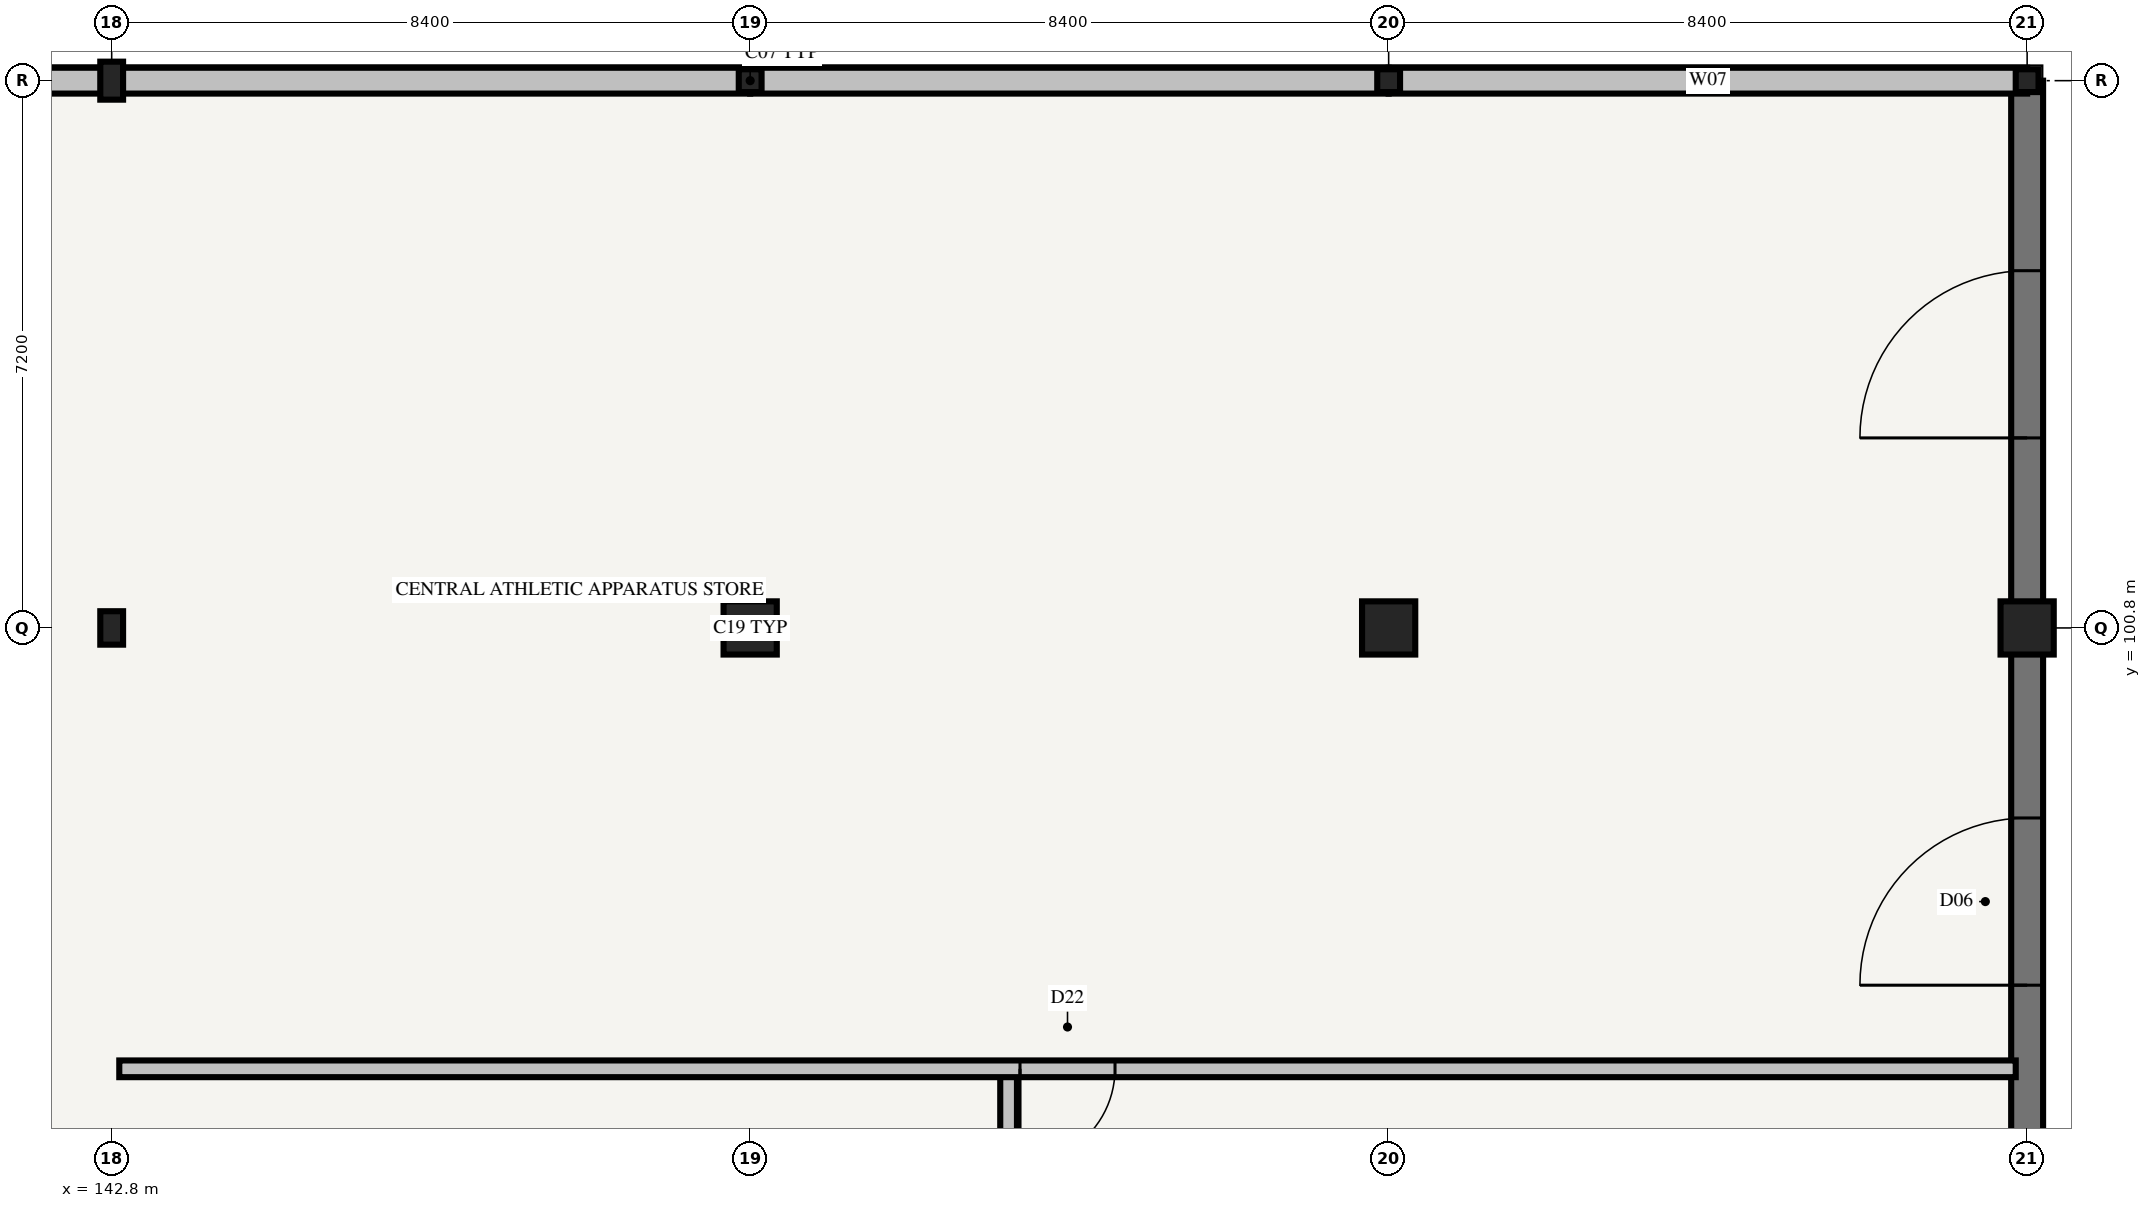
"""IFC4 building model, lengths in metres.
Left out: names, types, materials, properties, quantities, classifications, styles, units other than length and angle.
Written with IfcOpenShell. Run it as: python <this file> out.ifc"""

import sys

from ifc_helpers import new_model, si_unit, direction, frame, frame_2d, origin, origin_2d, place, context, subcontext, project, spatial, rectangle, i_section, extrude, element, fill, save


model = new_model("IFC4")
c1 = context("Model", 3, precision=1e-05, world=origin(), true_north=direction((0.0, 1.0)))
c2 = subcontext(c1, "Body", "Model", "MODEL_VIEW")
j1 = project(units=[si_unit("LENGTHUNIT", "METRE"), si_unit("PLANEANGLEUNIT", "RADIAN")], contexts=[c1])
p1 = place(None, origin())
s1 = spatial("IfcSite", under=j1, at=p1, CompositionType="ELEMENT")
p2 = place(p1, origin())
s2 = spatial("IfcBuilding", under=s1, at=p2, CompositionType="ELEMENT")
p3 = place(p2, origin())
s3 = spatial("IfcBuildingStorey", under=s2, at=p3, CompositionType="ELEMENT", Elevation=0.0)
p4 = place(p3, frame((142.8, 100.8, -0.42), z_axis=(0.0, 0.0, 1.0), x_axis=(1.0, 0.0, 0.0)))
e1 = element("IfcColumn", 1, at=p4, inside=s3, PredefinedType="COLUMN", context=c2, shape_type="SweptSolid", body=[
    extrude(i_section(OverallWidth=0.3, OverallDepth=0.44, WebThickness=0.011, FlangeThickness=0.021, FilletRadius=0.027, at=origin_2d()), origin(), (0.0, 0.0, 1.0), 4.92),
])
p5 = place(p3, frame((142.8, 108.0, -0.42), z_axis=(0.0, 0.0, 1.0), x_axis=(1.0, 0.0, 0.0)))
e2 = element("IfcColumn", 2, at=p5, inside=s3, PredefinedType="COLUMN", context=c2, shape_type="SweptSolid", body=[
    extrude(i_section(OverallWidth=0.3, OverallDepth=0.5, WebThickness=0.014, FlangeThickness=0.028, FilletRadius=0.027, at=origin_2d()), origin(), (0.0, 0.0, 1.0), 4.92),
])
p6 = place(p3, frame((151.2, 100.8, -0.42), z_axis=(0.0, 0.0, 1.0), x_axis=(1.0, 0.0, 0.0)))
e3 = element("IfcColumn", 3, at=p6, inside=s3, PredefinedType="COLUMN", context=c2, shape_type="SweptSolid", body=[
    extrude(rectangle(XDim=0.7, YDim=0.7, at=origin_2d()), origin(), (0.0, 0.0, 1.0), 4.92),
])
p7 = place(p3, frame((151.2, 108.0, -0.42), z_axis=(0.0, 0.0, 1.0), x_axis=(1.0, 0.0, 0.0)))
e4 = element("IfcColumn", 4, at=p7, inside=s3, PredefinedType="COLUMN", context=c2, shape_type="SweptSolid", body=[
    extrude(i_section(OverallWidth=0.3, OverallDepth=0.3, WebThickness=0.011, FlangeThickness=0.019, FilletRadius=0.027, at=origin_2d()), origin(), (0.0, 0.0, 1.0), 4.92),
])
p8 = place(p3, frame((159.6, 100.8, -0.42), z_axis=(0.0, 0.0, 1.0), x_axis=(1.0, 0.0, 0.0)))
e5 = element("IfcColumn", 5, at=p8, inside=s3, PredefinedType="COLUMN", context=c2, shape_type="SweptSolid", body=[
    extrude(rectangle(XDim=0.7, YDim=0.7, at=origin_2d()), origin(), (0.0, 0.0, 1.0), 4.92),
])
p9 = place(p3, frame((159.6, 108.0, -0.42), z_axis=(0.0, 0.0, 1.0), x_axis=(1.0, 0.0, 0.0)))
e6 = element("IfcColumn", 6, at=p9, inside=s3, PredefinedType="COLUMN", context=c2, shape_type="SweptSolid", body=[
    extrude(i_section(OverallWidth=0.3, OverallDepth=0.3, WebThickness=0.011, FlangeThickness=0.019, FilletRadius=0.027, at=origin_2d()), origin(), (0.0, 0.0, 1.0), 4.92),
])
p10 = place(p3, frame((168.0, 100.8, -0.42), z_axis=(0.0, 0.0, 1.0), x_axis=(1.0, 0.0, 0.0)))
e7 = element("IfcColumn", 7, at=p10, inside=s3, PredefinedType="COLUMN", context=c2, shape_type="SweptSolid", body=[
    extrude(rectangle(XDim=0.7, YDim=0.7, at=origin_2d()), origin(), (0.0, 0.0, 1.0), 4.92),
])
p11 = place(p3, frame((168.0, 108.0, -0.42), z_axis=(0.0, 0.0, 1.0), x_axis=(1.0, 0.0, 0.0)))
e8 = element("IfcColumn", 8, at=p11, inside=s3, PredefinedType="COLUMN", context=c2, shape_type="SweptSolid", body=[
    extrude(i_section(OverallWidth=0.3, OverallDepth=0.3, WebThickness=0.011, FlangeThickness=0.019, FilletRadius=0.027, at=origin_2d()), origin(), (0.0, 0.0, 1.0), 4.92),
])
p12 = place(p3, frame((168.0, 93.6, 0.0), z_axis=(0.0, 0.0, 1.0), x_axis=(0.0, 1.0, 0.0)))
e9 = element("IfcWall", 9, at=p12, inside=s3, PredefinedType="SOLIDWALL", context=c2, shape_type="SweptSolid", body=[
    extrude(rectangle(XDim=7.2, YDim=0.42, at=frame_2d((3.6, 0.0))), origin(), (0.0, 0.0, 1.0), 3.755),
])
p13 = place(p12, frame((2.5, 0.0, 0.0)))
e10 = element("IfcOpeningElement", 10, at=p13, cuts=e9, PredefinedType="OPENING", context=c2, shape_type="SweptSolid", body=[
    extrude(rectangle(XDim=2.2, YDim=2.6, at=frame_2d((1.1, 1.3))), frame((0.0, 0.235, 0.0), z_axis=(0.0, -1.0, 0.0), x_axis=(1.0, 0.0, 0.0)), (0.0, 0.0, 1.0), 0.47),
])
p14 = place(p3, frame((168.0, 100.8, 0.0), z_axis=(0.0, 0.0, 1.0), x_axis=(0.0, 1.0, 0.0)))
e11 = element("IfcWall", 11, at=p14, inside=s3, PredefinedType="SOLIDWALL", context=c2, shape_type="SweptSolid", body=[
    extrude(rectangle(XDim=7.2, YDim=0.42, at=frame_2d((3.6, 0.0))), origin(), (0.0, 0.0, 1.0), 3.755),
])
p15 = place(p14, frame((2.5, 0.0, 0.0)))
e12 = element("IfcOpeningElement", 12, at=p15, cuts=e11, PredefinedType="OPENING", context=c2, shape_type="SweptSolid", body=[
    extrude(rectangle(XDim=2.2, YDim=2.6, at=frame_2d((1.1, 1.3))), frame((0.0, 0.235, 0.0), z_axis=(0.0, -1.0, 0.0), x_axis=(1.0, 0.0, 0.0)), (0.0, 0.0, 1.0), 0.47),
])
p16 = place(p3, frame((168.0, 108.0, 0.0), z_axis=(0.0, 0.0, 1.0), x_axis=(-1.0, 0.0, 0.0)))
e13 = element("IfcWall", 13, at=p16, inside=s3, PredefinedType="STANDARD", context=c2, shape_type="SweptSolid", body=[
    extrude(rectangle(XDim=8.4, YDim=0.34, at=frame_2d((4.2, 0.0))), origin(), (0.0, 0.0, 1.0), 3.755),
])
p17 = place(p3, frame((159.6, 108.0, 0.0), z_axis=(0.0, 0.0, 1.0), x_axis=(-1.0, 0.0, 0.0)))
e14 = element("IfcWall", 14, at=p17, inside=s3, PredefinedType="STANDARD", context=c2, shape_type="SweptSolid", body=[
    extrude(rectangle(XDim=8.4, YDim=0.34, at=frame_2d((4.2, 0.0))), origin(), (0.0, 0.0, 1.0), 3.705),
])
p18 = place(p3, frame((151.2, 108.0, 0.0), z_axis=(0.0, 0.0, 1.0), x_axis=(-1.0, 0.0, 0.0)))
e15 = element("IfcWall", 15, at=p18, inside=s3, PredefinedType="STANDARD", context=c2, shape_type="SweptSolid", body=[
    extrude(rectangle(XDim=8.4, YDim=0.34, at=frame_2d((4.2, 0.0))), origin(), (0.0, 0.0, 1.0), 3.705),
])
p19 = place(p3, frame((142.8, 108.0, 0.0), z_axis=(0.0, 0.0, 1.0), x_axis=(-1.0, 0.0, 0.0)))
e16 = element("IfcWall", 16, at=p19, inside=s3, PredefinedType="STANDARD", context=c2, shape_type="SweptSolid", body=[
    extrude(rectangle(XDim=8.4, YDim=0.34, at=frame_2d((4.2, 0.0))), origin(), (0.0, 0.0, 1.0), 3.765),
])
p20 = place(p3, frame((154.6, 88.2, 0.0), z_axis=(0.0, 0.0, 1.0), x_axis=(0.0, 1.0, 0.0)))
e17 = element("IfcWall", 17, at=p20, inside=s3, PredefinedType="PARTITIONING", context=c2, shape_type="SweptSolid", body=[
    extrude(rectangle(XDim=6.7, YDim=0.22, at=frame_2d((3.35, 0.0))), origin(), (0.0, 0.0, 1.0), 3.62),
])
p21 = place(p3, frame((142.9, 95.0, 0.0), z_axis=(0.0, 0.0, 1.0), x_axis=(1.0, 0.0, 0.0)))
e18 = element("IfcWall", 18, at=p21, inside=s3, PredefinedType="PARTITIONING", context=c2, shape_type="SweptSolid", body=[
    extrude(rectangle(XDim=24.95, YDim=0.22, at=frame_2d((12.475, 0.0))), origin(), (0.0, 0.0, 1.0), 3.62),
])
p22 = place(p21, frame((11.85, 0.0, 0.0)))
e19 = element("IfcOpeningElement", 19, at=p22, cuts=e18, PredefinedType="OPENING", context=c2, shape_type="SweptSolid", body=[
    extrude(rectangle(XDim=1.25, YDim=2.2, at=frame_2d((0.625, 1.1))), frame((0.0, 0.135, 0.0), z_axis=(0.0, -1.0, 0.0), x_axis=(1.0, 0.0, 0.0)), (0.0, 0.0, 1.0), 0.27),
])
p23 = place(p13, frame((2.2, 0.0, 0.0), z_axis=(0.0, 0.0, 1.0), x_axis=(-1.0, 0.0, 0.0)))
e20 = element("IfcDoor", 20, at=p23, inside=s3, OperationType="DOUBLE_DOOR_SINGLE_SWING", PredefinedType="DOOR", context=c2, shape_type="SweptSolid", body=[
    extrude(rectangle(XDim=2.2, YDim=2.6, at=frame_2d((1.1, 1.3))), frame((0.0, 0.025, 0.0), z_axis=(0.0, -1.0, 0.0), x_axis=(1.0, 0.0, 0.0)), (0.0, 0.0, 1.0), 0.05),
])
fill(e10, e20)
p24 = place(p15, frame((2.2, 0.0, 0.0), z_axis=(0.0, 0.0, 1.0), x_axis=(-1.0, 0.0, 0.0)))
e21 = element("IfcDoor", 21, at=p24, inside=s3, OperationType="DOUBLE_DOOR_SINGLE_SWING", PredefinedType="DOOR", context=c2, shape_type="SweptSolid", body=[
    extrude(rectangle(XDim=2.2, YDim=2.6, at=frame_2d((1.1, 1.3))), frame((0.0, 0.025, 0.0), z_axis=(0.0, -1.0, 0.0), x_axis=(1.0, 0.0, 0.0)), (0.0, 0.0, 1.0), 0.05),
])
fill(e12, e21)
p25 = place(p22, origin())
e22 = element("IfcDoor", 22, at=p25, inside=s3, OperationType="SINGLE_SWING_RIGHT", PredefinedType="DOOR", context=c2, shape_type="SweptSolid", body=[
    extrude(rectangle(XDim=1.25, YDim=2.2, at=frame_2d((0.625, 1.1))), frame((0.0, 0.025, 0.0), z_axis=(0.0, -1.0, 0.0), x_axis=(1.0, 0.0, 0.0)), (0.0, 0.0, 1.0), 0.05),
])
fill(e19, e22)
save(model, sys.argv[1])
